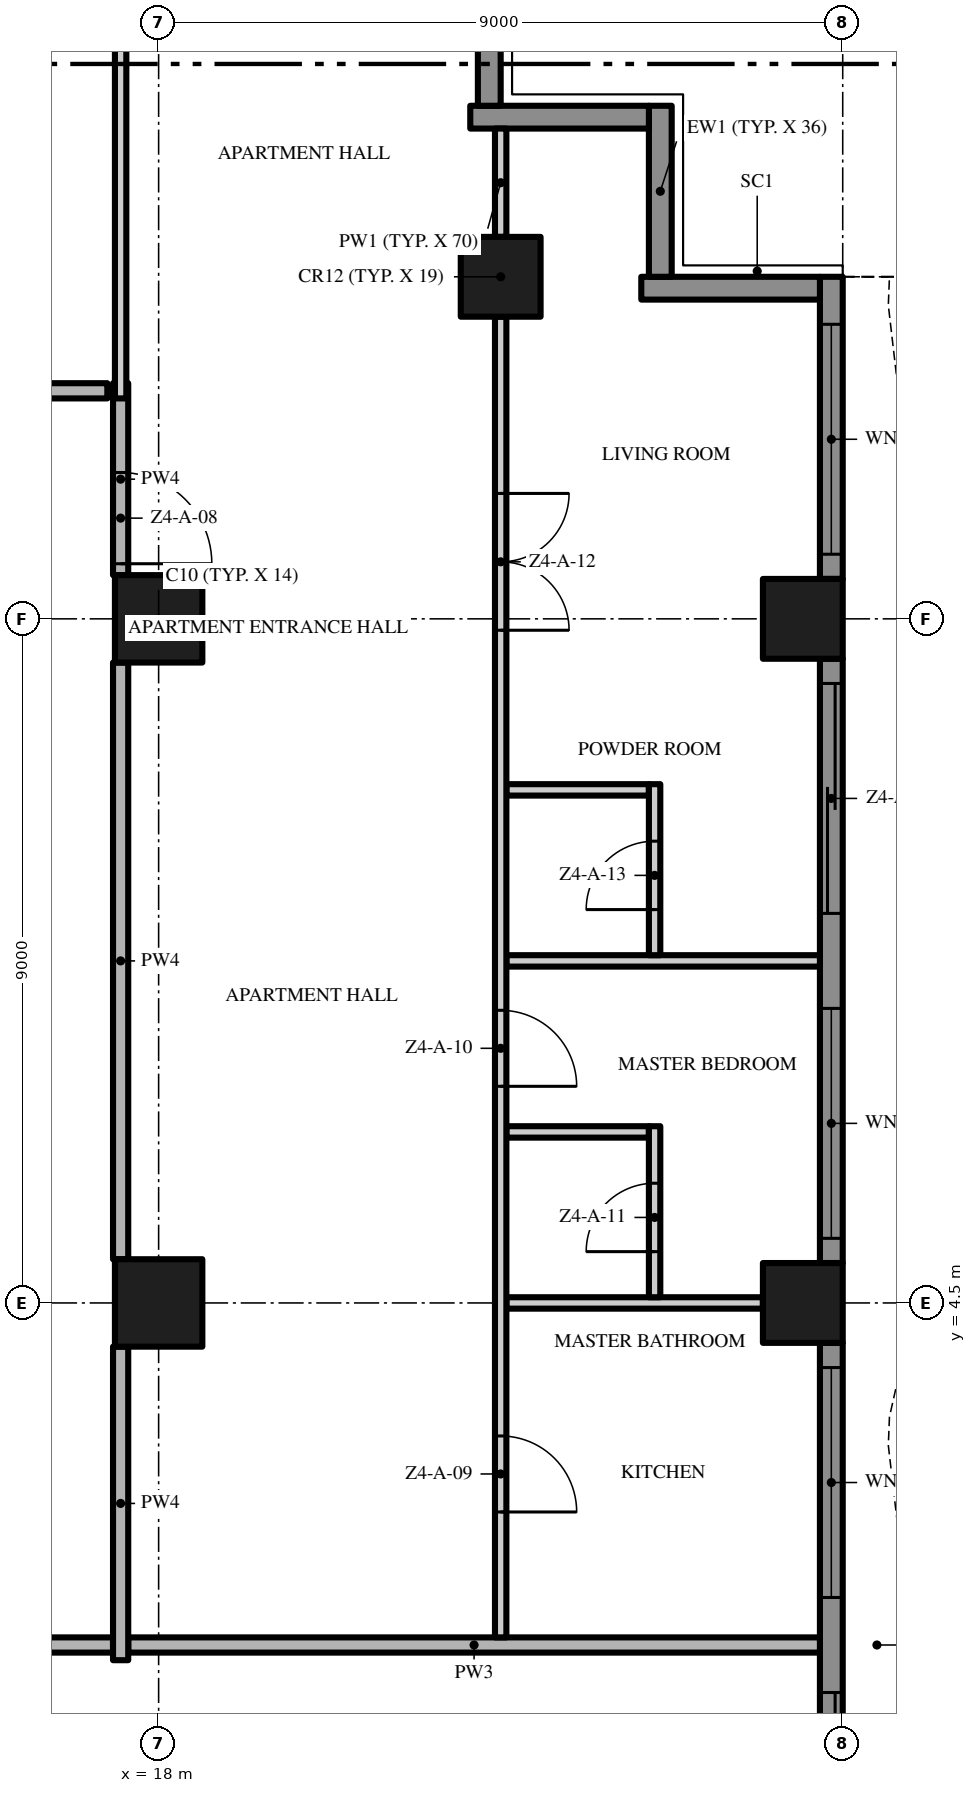
"""IFC4 building model, lengths in metres.
Left out: names, types, materials, properties, quantities, classifications, styles, units other than length and angle.
Written with IfcOpenShell. Run it as: python <this file> out.ifc"""

import sys

from ifc_helpers import new_model, si_unit, direction, frame, frame_2d, origin, origin_2d, place, context, subcontext, project, spatial, polyline, rectangle, outline, extrude, element, fill, save


model = new_model("IFC4")
c1 = context("Model", 3, precision=1e-05, world=origin(), true_north=direction((0.0, 1.0)))
c2 = subcontext(c1, "Body", "Model", "MODEL_VIEW")
j1 = project(units=[si_unit("LENGTHUNIT", "METRE"), si_unit("PLANEANGLEUNIT", "RADIAN")], contexts=[c1])
p1 = place(None, origin())
s1 = spatial("IfcSite", under=j1, at=p1, CompositionType="ELEMENT")
p2 = place(p1, origin())
s2 = spatial("IfcBuilding", under=s1, at=p2, CompositionType="ELEMENT")
p3 = place(p2, frame((0.0, 0.0, 192.0)))
s3 = spatial("IfcBuildingStorey", under=s2, at=p3, CompositionType="ELEMENT", Elevation=192.0)
for number, where, z_axis, x_axis in (
    (1, (18.0, 13.5, 0.0), (0.0, 0.0, 1.0), (1.0, 0.0, 0.0)),
    (2, (18.0, 4.5, 0.0), (0.0, 0.0, 1.0), (1.0, 0.0, 0.0)),
):
    element("IfcColumn", number, at=place(p3, frame(where, z_axis=z_axis, x_axis=x_axis)), inside=s3, PredefinedType="COLUMN", context=c2, shape_type="SweptSolid", body=[
        extrude(rectangle(XDim=1.15, YDim=1.15, at=origin_2d()), origin(), (0.0, 0.0, 1.0), 3.5),
    ])
for number, where, z_axis, x_axis in (
    (3, (26.475, 13.5, 0.0), (0.0, 0.0, 1.0), (1.0, 0.0, 0.0)),
    (4, (22.5, 18.0, 0.0), (0.0, 0.0, 1.0), (1.0, 0.0, 0.0)),
    (5, (26.475, 4.5, 0.0), (0.0, 0.0, 1.0), (1.0, 0.0, 0.0)),
):
    element("IfcColumn", number, at=place(p3, frame(where, z_axis=z_axis, x_axis=x_axis)), inside=s3, PredefinedType="COLUMN", context=c2, shape_type="SweptSolid", body=[
        extrude(rectangle(XDim=1.05, YDim=1.05, at=origin_2d()), origin(), (0.0, 0.0, 1.0), 3.5),
    ])
p4 = place(p3, frame((26.85, 3.975, 0.0), z_axis=(0.0, 0.0, 1.0), x_axis=(0.0, -1.0, 0.0)))
e6 = element("IfcWall", 6, at=p4, inside=s3, PredefinedType="SOLIDWALL", context=c2, shape_type="SweptSolid", body=[
    extrude(rectangle(XDim=7.95, YDim=0.3, at=frame_2d((3.975, 0.0))), origin(), (0.0, 0.0, 1.0), 3.5),
])
p5 = place(p4, frame((4.6, 0.0, 0.0)))
e7 = element("IfcOpeningElement", 7, at=p5, cuts=e6, PredefinedType="OPENING", context=c2, shape_type="SweptSolid", body=[
    extrude(rectangle(XDim=3.025, YDim=2.4, at=frame_2d((1.512, 1.2))), frame((0.0, 0.16, 0.0), z_axis=(0.0, -1.0, 0.0), x_axis=(1.0, 0.0, 0.0)), (0.0, 0.0, 1.0), 0.32),
])
p6 = place(p4, frame((0.325, 0.0, 0.45)))
e8 = element("IfcOpeningElement", 8, at=p6, cuts=e6, PredefinedType="OPENING", context=c2, shape_type="SweptSolid", body=[
    extrude(rectangle(XDim=3.025, YDim=2.65, at=frame_2d((1.512, 1.325))), frame((0.0, 0.16, 0.0), z_axis=(0.0, -1.0, 0.0), x_axis=(1.0, 0.0, 0.0)), (0.0, 0.0, 1.0), 0.32),
])
p7 = place(p3, frame((26.85, 12.975, 0.0), z_axis=(0.0, 0.0, 1.0), x_axis=(0.0, -1.0, 0.0)))
e9 = element("IfcWall", 9, at=p7, inside=s3, PredefinedType="SOLIDWALL", context=c2, shape_type="SweptSolid", body=[
    extrude(rectangle(XDim=7.95, YDim=0.3, at=frame_2d((3.975, 0.0))), origin(), (0.0, 0.0, 1.0), 3.5),
])
p8 = place(p7, frame((4.6, 0.0, 0.45)))
e10 = element("IfcOpeningElement", 10, at=p8, cuts=e9, PredefinedType="OPENING", context=c2, shape_type="SweptSolid", body=[
    extrude(rectangle(XDim=3.025, YDim=2.65, at=frame_2d((1.512, 1.325))), frame((0.0, 0.16, 0.0), z_axis=(0.0, -1.0, 0.0), x_axis=(1.0, 0.0, 0.0)), (0.0, 0.0, 1.0), 0.32),
])
p9 = place(p7, frame((0.325, 0.0, 0.0)))
e11 = element("IfcOpeningElement", 11, at=p9, cuts=e9, PredefinedType="OPENING", context=c2, shape_type="SweptSolid", body=[
    extrude(rectangle(XDim=3.025, YDim=2.4, at=frame_2d((1.512, 1.2))), frame((0.0, 0.16, 0.0), z_axis=(0.0, -1.0, 0.0), x_axis=(1.0, 0.0, 0.0)), (0.0, 0.0, 1.0), 0.32),
])
p10 = place(p3, frame((26.85, 18.0, 0.0), z_axis=(0.0, 0.0, 1.0), x_axis=(0.0, -1.0, 0.0)))
e12 = element("IfcWall", 12, at=p10, inside=s3, PredefinedType="SOLIDWALL", context=c2, shape_type="SweptSolid", body=[
    extrude(rectangle(XDim=3.975, YDim=0.3, at=frame_2d((1.988, 0.0))), origin(), (0.0, 0.0, 1.0), 3.5),
])
p11 = place(p10, frame((0.625, 0.0, 0.45)))
e13 = element("IfcOpeningElement", 13, at=p11, cuts=e12, PredefinedType="OPENING", context=c2, shape_type="SweptSolid", body=[
    extrude(rectangle(XDim=3.025, YDim=2.65, at=frame_2d((1.512, 1.325))), frame((0.0, 0.16, 0.0), z_axis=(0.0, -1.0, 0.0), x_axis=(1.0, 0.0, 0.0)), (0.0, 0.0, 1.0), 0.32),
])
p12 = place(p3, frame((24.35, 17.85, 0.0), z_axis=(0.0, 0.0, 1.0), x_axis=(1.0, 0.0, 0.0)))
e14 = element("IfcWall", 14, at=p12, inside=s3, PredefinedType="SOLIDWALL", context=c2, shape_type="SweptSolid", body=[
    extrude(rectangle(XDim=2.35, YDim=0.3, at=frame_2d((1.175, 0.0))), origin(), (0.0, 0.0, 1.0), 3.5),
])
p13 = place(p3, frame((24.6, 20.25, 0.0), z_axis=(0.0, 0.0, 1.0), x_axis=(0.0, -1.0, 0.0)))
e15 = element("IfcWall", 15, at=p13, inside=s3, PredefinedType="SOLIDWALL", context=c2, shape_type="SweptSolid", body=[
    extrude(rectangle(XDim=2.25, YDim=0.3, at=frame_2d((1.125, 0.0))), origin(), (0.0, 0.0, 1.0), 3.5),
])
p14 = place(p3, frame((22.1, 20.1, 0.0), z_axis=(0.0, 0.0, 1.0), x_axis=(1.0, 0.0, 0.0)))
e16 = element("IfcWall", 16, at=p14, inside=s3, PredefinedType="SOLIDWALL", context=c2, shape_type="SweptSolid", body=[
    extrude(rectangle(XDim=2.35, YDim=0.3, at=frame_2d((1.175, 0.0))), origin(), (0.0, 0.0, 1.0), 3.5),
])
p15 = place(p3, frame((22.35, 22.5, 0.0), z_axis=(0.0, 0.0, 1.0), x_axis=(0.0, -1.0, 0.0)))
e17 = element("IfcWall", 17, at=p15, inside=s3, PredefinedType="SOLIDWALL", context=c2, shape_type="SweptSolid", body=[
    extrude(rectangle(XDim=2.25, YDim=0.3, at=frame_2d((1.125, 0.0))), origin(), (0.0, 0.0, 1.0), 3.5),
])
p16 = place(p3, origin())
e18 = element("IfcWall", 18, at=p16, inside=s3, PredefinedType="USERDEFINED", context=c2, shape_type="SweptSolid", body=[
    extrude(outline(polyline([(29.649, -18.0), (28.988, -16.5), (28.255, -15.0), (27.731, -13.5), (27.6, -12.375), (27.615, -12.0), (27.951, -10.5), (28.612, -9.0), (29.345, -7.5), (29.869, -6.0), (30.0, -4.875), (29.985, -4.5), (29.649, -3.0), (28.988, -1.5), (28.255, 0.0), (27.731, 1.5), (27.6, 2.625), (27.615, 3.0), (27.951, 4.5), (28.612, 6.0), (29.345, 7.5), (29.869, 9.0), (30.0, 10.125), (29.985, 10.5), (29.649, 12.0), (28.988, 13.5), (28.255, 15.0), (27.731, 16.5), (27.6, 17.625), (27.615, 18.0), (27.365, 18.01), (27.349, 17.615), (27.486, 16.444), (28.024, 14.904), (28.761, 13.395), (29.41, 11.921), (29.736, 10.467), (29.749, 10.135), (29.624, 9.056), (29.114, 7.596), (28.385, 6.105), (27.713, 4.579), (27.366, 3.033), (27.349, 2.615), (27.486, 1.444), (28.024, -0.096), (28.761, -1.605), (29.41, -3.079), (29.736, -4.533), (29.749, -4.865), (29.624, -5.944), (29.114, -7.404), (28.385, -8.895), (27.713, -10.421), (27.366, -11.967), (27.349, -12.385), (27.486, -13.556), (28.024, -15.096), (28.761, -16.605), (29.42, -18.101), (29.649, -18.0)])), origin(), (0.0, 0.0, 1.0), 0.9),
])
p17 = place(p3, frame((17.4, 0.0, 0.0), z_axis=(0.0, 0.0, 1.0), x_axis=(-1.0, 0.0, 0.0)))
e19 = element("IfcWall", 19, at=p17, inside=s3, PredefinedType="PARTITIONING", context=c2, shape_type="SweptSolid", body=[
    extrude(rectangle(XDim=17.3, YDim=0.2, at=frame_2d((8.65, 0.0))), origin(), (0.0, 0.0, 1.0), 3.5),
])
p18 = place(p17, frame((7.65, 0.0, 0.0)))
e20 = element("IfcOpeningElement", 20, at=p18, cuts=e19, PredefinedType="OPENING", context=c2, shape_type="SweptSolid", body=[
    extrude(rectangle(XDim=1.5, YDim=2.4, at=frame_2d((0.75, 1.2))), frame((0.0, 0.11, 0.0), z_axis=(0.0, -1.0, 0.0), x_axis=(1.0, 0.0, 0.0)), (0.0, 0.0, 1.0), 0.22),
])
p19 = place(p3, frame((17.6, 0.0, 0.0), z_axis=(0.0, 0.0, 1.0), x_axis=(1.0, 0.0, 0.0)))
e21 = element("IfcWall", 21, at=p19, inside=s3, PredefinedType="PARTITIONING", context=c2, shape_type="SweptSolid", body=[
    extrude(rectangle(XDim=9.1, YDim=0.2, at=frame_2d((4.55, 0.0))), origin(), (0.0, 0.0, 1.0), 3.5),
])
p20 = place(p3, frame((22.575, 4.5, 0.0), z_axis=(0.0, 0.0, 1.0), x_axis=(1.0, 0.0, 0.0)))
e22 = element("IfcWall", 22, at=p20, inside=s3, PredefinedType="PARTITIONING", context=c2, shape_type="SweptSolid", body=[
    extrude(rectangle(XDim=3.375, YDim=0.15, at=frame_2d((1.688, 0.0))), origin(), (0.0, 0.0, 1.0), 3.5),
])
p21 = place(p3, frame((22.575, 6.75, 0.0), z_axis=(0.0, 0.0, 1.0), x_axis=(1.0, 0.0, 0.0)))
e23 = element("IfcWall", 23, at=p21, inside=s3, PredefinedType="PARTITIONING", context=c2, shape_type="SweptSolid", body=[
    extrude(rectangle(XDim=1.875, YDim=0.15, at=frame_2d((0.938, 0.0))), origin(), (0.0, 0.0, 1.0), 3.5),
])
p22 = place(p3, frame((22.575, 9.0, 0.0), z_axis=(0.0, 0.0, 1.0), x_axis=(1.0, 0.0, 0.0)))
e24 = element("IfcWall", 24, at=p22, inside=s3, PredefinedType="PARTITIONING", context=c2, shape_type="SweptSolid", body=[
    extrude(rectangle(XDim=4.125, YDim=0.15, at=frame_2d((2.062, 0.0))), origin(), (0.0, 0.0, 1.0), 3.5),
])
p23 = place(p3, frame((22.575, 11.25, 0.0), z_axis=(0.0, 0.0, 1.0), x_axis=(1.0, 0.0, 0.0)))
e25 = element("IfcWall", 25, at=p23, inside=s3, PredefinedType="PARTITIONING", context=c2, shape_type="SweptSolid", body=[
    extrude(rectangle(XDim=1.875, YDim=0.15, at=frame_2d((0.938, 0.0))), origin(), (0.0, 0.0, 1.0), 3.5),
])
p24 = place(p3, frame((13.5, 16.5, 0.0), z_axis=(0.0, 0.0, 1.0), x_axis=(1.0, 0.0, 0.0)))
e26 = element("IfcWall", 26, at=p24, inside=s3, PredefinedType="PARTITIONING", context=c2, shape_type="SweptSolid", body=[
    extrude(rectangle(XDim=3.825, YDim=0.2, at=frame_2d((1.913, 0.0))), origin(), (0.0, 0.0, 1.0), 3.5),
])
p25 = place(p24, frame((1.55, 0.0, 0.0)))
e27 = element("IfcOpeningElement", 27, at=p25, cuts=e26, PredefinedType="OPENING", context=c2, shape_type="SweptSolid", body=[
    extrude(rectangle(XDim=0.9, YDim=2.1, at=frame_2d((0.45, 1.05))), frame((0.0, 0.11, 0.0), z_axis=(0.0, -1.0, 0.0), x_axis=(1.0, 0.0, 0.0)), (0.0, 0.0, 1.0), 0.22),
])
p26 = place(p3, frame((17.5, -0.2, 0.0), z_axis=(0.0, 0.0, 1.0), x_axis=(0.0, 1.0, 0.0)))
e28 = element("IfcWall", 28, at=p26, inside=s3, PredefinedType="PARTITIONING", context=c2, shape_type="SweptSolid", body=[
    extrude(rectangle(XDim=4.125, YDim=0.2, at=frame_2d((2.062, 0.0))), origin(), (0.0, 0.0, 1.0), 3.5),
])
p27 = place(p3, frame((17.5, 5.075, 0.0), z_axis=(0.0, 0.0, 1.0), x_axis=(0.0, 1.0, 0.0)))
e29 = element("IfcWall", 29, at=p27, inside=s3, PredefinedType="PARTITIONING", context=c2, shape_type="SweptSolid", body=[
    extrude(rectangle(XDim=7.85, YDim=0.2, at=frame_2d((3.925, 0.0))), origin(), (0.0, 0.0, 1.0), 3.5),
])
p28 = place(p3, frame((17.5, 16.6, 0.0), z_axis=(0.0, 0.0, 1.0), x_axis=(0.0, -1.0, 0.0)))
e30 = element("IfcWall", 30, at=p28, inside=s3, PredefinedType="PARTITIONING", context=c2, shape_type="SweptSolid", body=[
    extrude(rectangle(XDim=2.525, YDim=0.2, at=frame_2d((1.262, 0.0))), origin(), (0.0, 0.0, 1.0), 3.5),
])
p29 = place(p28, frame((1.175, 0.0, 0.0)))
e31 = element("IfcOpeningElement", 31, at=p29, cuts=e30, PredefinedType="OPENING", context=c2, shape_type="SweptSolid", body=[
    extrude(rectangle(XDim=1.2, YDim=2.4, at=frame_2d((0.6, 1.2))), frame((0.0, 0.11, 0.0), z_axis=(0.0, -1.0, 0.0), x_axis=(1.0, 0.0, 0.0)), (0.0, 0.0, 1.0), 0.22),
])
p30 = place(p3, frame((17.5, 16.4, 0.0), z_axis=(0.0, 0.0, 1.0), x_axis=(0.0, 1.0, 0.0)))
e32 = element("IfcWall", 32, at=p30, inside=s3, PredefinedType="PARTITIONING", context=c2, shape_type="SweptSolid", body=[
    extrude(rectangle(XDim=5.05, YDim=0.15, at=frame_2d((2.525, 0.0))), origin(), (0.0, 0.0, 1.0), 3.5),
])
p31 = place(p3, frame((22.5, 17.475, 0.0), z_axis=(0.0, 0.0, 1.0), x_axis=(0.0, -1.0, 0.0)))
e33 = element("IfcWall", 33, at=p31, inside=s3, PredefinedType="PARTITIONING", context=c2, shape_type="SweptSolid", body=[
    extrude(rectangle(XDim=17.375, YDim=0.15, at=frame_2d((8.688, 0.0))), origin(), (0.0, 0.0, 1.0), 3.5),
])
p32 = place(p31, frame((14.725, 0.0, 0.0)))
e34 = element("IfcOpeningElement", 34, at=p32, cuts=e33, PredefinedType="OPENING", context=c2, shape_type="SweptSolid", body=[
    extrude(rectangle(XDim=1.0, YDim=2.4, at=frame_2d((0.5, 1.2))), frame((0.0, 0.085, 0.0), z_axis=(0.0, -1.0, 0.0), x_axis=(1.0, 0.0, 0.0)), (0.0, 0.0, 1.0), 0.17),
])
p33 = place(p31, frame((9.125, 0.0, 0.0)))
e35 = element("IfcOpeningElement", 35, at=p33, cuts=e33, PredefinedType="OPENING", context=c2, shape_type="SweptSolid", body=[
    extrude(rectangle(XDim=1.0, YDim=2.4, at=frame_2d((0.5, 1.2))), frame((0.0, 0.085, 0.0), z_axis=(0.0, -1.0, 0.0), x_axis=(1.0, 0.0, 0.0)), (0.0, 0.0, 1.0), 0.17),
])
p34 = place(p31, frame((2.325, 0.0, 0.0)))
e36 = element("IfcOpeningElement", 36, at=p34, cuts=e33, PredefinedType="OPENING", context=c2, shape_type="SweptSolid", body=[
    extrude(rectangle(XDim=1.8, YDim=2.4, at=frame_2d((0.9, 1.2))), frame((0.0, 0.085, 0.0), z_axis=(0.0, -1.0, 0.0), x_axis=(1.0, 0.0, 0.0)), (0.0, 0.0, 1.0), 0.17),
])
p35 = place(p3, frame((22.5, 18.525, 0.0), z_axis=(0.0, 0.0, 1.0), x_axis=(0.0, 1.0, 0.0)))
e37 = element("IfcWall", 37, at=p35, inside=s3, PredefinedType="PARTITIONING", context=c2, shape_type="SweptSolid", body=[
    extrude(rectangle(XDim=1.425, YDim=0.15, at=frame_2d((0.713, 0.0))), origin(), (0.0, 0.0, 1.0), 3.5),
])
p36 = place(p3, frame((24.525, 4.575, 0.0), z_axis=(0.0, 0.0, 1.0), x_axis=(0.0, 1.0, 0.0)))
e38 = element("IfcWall", 38, at=p36, inside=s3, PredefinedType="PARTITIONING", context=c2, shape_type="SweptSolid", body=[
    extrude(rectangle(XDim=2.25, YDim=0.15, at=frame_2d((1.125, 0.0))), origin(), (0.0, 0.0, 1.0), 3.5),
])
p37 = place(p36, frame((0.6, 0.0, 0.0)))
e39 = element("IfcOpeningElement", 39, at=p37, cuts=e38, PredefinedType="OPENING", context=c2, shape_type="SweptSolid", body=[
    extrude(rectangle(XDim=0.9, YDim=2.1, at=frame_2d((0.45, 1.05))), frame((0.0, 0.085, 0.0), z_axis=(0.0, -1.0, 0.0), x_axis=(1.0, 0.0, 0.0)), (0.0, 0.0, 1.0), 0.17),
])
p38 = place(p3, frame((24.525, 9.075, 0.0), z_axis=(0.0, 0.0, 1.0), x_axis=(0.0, 1.0, 0.0)))
e40 = element("IfcWall", 40, at=p38, inside=s3, PredefinedType="PARTITIONING", context=c2, shape_type="SweptSolid", body=[
    extrude(rectangle(XDim=2.25, YDim=0.15, at=frame_2d((1.125, 0.0))), origin(), (0.0, 0.0, 1.0), 3.5),
])
p39 = place(p38, frame((0.6, 0.0, 0.0)))
e41 = element("IfcOpeningElement", 41, at=p39, cuts=e40, PredefinedType="OPENING", context=c2, shape_type="SweptSolid", body=[
    extrude(rectangle(XDim=0.9, YDim=2.1, at=frame_2d((0.45, 1.05))), frame((0.0, 0.085, 0.0), z_axis=(0.0, -1.0, 0.0), x_axis=(1.0, 0.0, 0.0)), (0.0, 0.0, 1.0), 0.17),
])
p40 = place(p5, origin())
e42 = element("IfcDoor", 42, at=p40, inside=s3, OperationType="SINGLE_SWING_LEFT", PredefinedType="DOOR", context=c2, shape_type="SweptSolid", body=[
    extrude(rectangle(XDim=3.025, YDim=2.4, at=frame_2d((1.512, 1.2))), frame((0.0, 0.025, 0.0), z_axis=(0.0, -1.0, 0.0), x_axis=(1.0, 0.0, 0.0)), (0.0, 0.0, 1.0), 0.05),
])
fill(e7, e42)
p41 = place(p6, origin())
e43 = element("IfcWindow", 43, at=p41, inside=s3, PartitioningType="SINGLE_PANEL", PredefinedType="WINDOW", context=c2, shape_type="SweptSolid", body=[
    extrude(rectangle(XDim=3.025, YDim=2.65, at=frame_2d((1.512, 1.325))), frame((0.0, 0.03, 0.0), z_axis=(0.0, -1.0, 0.0), x_axis=(1.0, 0.0, 0.0)), (0.0, 0.0, 1.0), 0.06),
])
fill(e8, e43)
p42 = place(p8, origin())
e44 = element("IfcWindow", 44, at=p42, inside=s3, PartitioningType="SINGLE_PANEL", PredefinedType="WINDOW", context=c2, shape_type="SweptSolid", body=[
    extrude(rectangle(XDim=3.025, YDim=2.65, at=frame_2d((1.512, 1.325))), frame((0.0, 0.03, 0.0), z_axis=(0.0, -1.0, 0.0), x_axis=(1.0, 0.0, 0.0)), (0.0, 0.0, 1.0), 0.06),
])
fill(e10, e44)
p43 = place(p9, origin())
e45 = element("IfcDoor", 45, at=p43, inside=s3, OperationType="SINGLE_SWING_LEFT", PredefinedType="DOOR", context=c2, shape_type="SweptSolid", body=[
    extrude(rectangle(XDim=3.025, YDim=2.4, at=frame_2d((1.512, 1.2))), frame((0.0, 0.025, 0.0), z_axis=(0.0, -1.0, 0.0), x_axis=(1.0, 0.0, 0.0)), (0.0, 0.0, 1.0), 0.05),
])
fill(e11, e45)
p44 = place(p11, origin())
e46 = element("IfcWindow", 46, at=p44, inside=s3, PartitioningType="SINGLE_PANEL", PredefinedType="WINDOW", context=c2, shape_type="SweptSolid", body=[
    extrude(rectangle(XDim=3.025, YDim=2.65, at=frame_2d((1.512, 1.325))), frame((0.0, 0.03, 0.0), z_axis=(0.0, -1.0, 0.0), x_axis=(1.0, 0.0, 0.0)), (0.0, 0.0, 1.0), 0.06),
])
fill(e13, e46)
p45 = place(p29, origin())
e47 = element("IfcDoor", 47, at=p45, inside=s3, OperationType="SINGLE_SWING_RIGHT", PredefinedType="DOOR", context=c2, shape_type="SweptSolid", body=[
    extrude(rectangle(XDim=1.2, YDim=2.4, at=frame_2d((0.6, 1.2))), frame((0.0, 0.025, 0.0), z_axis=(0.0, -1.0, 0.0), x_axis=(1.0, 0.0, 0.0)), (0.0, 0.0, 1.0), 0.05),
])
fill(e31, e47)
p46 = place(p32, origin())
e48 = element("IfcDoor", 48, at=p46, inside=s3, OperationType="SINGLE_SWING_RIGHT", PredefinedType="DOOR", context=c2, shape_type="SweptSolid", body=[
    extrude(rectangle(XDim=1.0, YDim=2.4, at=frame_2d((0.5, 1.2))), frame((0.0, 0.025, 0.0), z_axis=(0.0, -1.0, 0.0), x_axis=(1.0, 0.0, 0.0)), (0.0, 0.0, 1.0), 0.05),
])
fill(e34, e48)
p47 = place(p33, origin())
e49 = element("IfcDoor", 49, at=p47, inside=s3, OperationType="SINGLE_SWING_RIGHT", PredefinedType="DOOR", context=c2, shape_type="SweptSolid", body=[
    extrude(rectangle(XDim=1.0, YDim=2.4, at=frame_2d((0.5, 1.2))), frame((0.0, 0.025, 0.0), z_axis=(0.0, -1.0, 0.0), x_axis=(1.0, 0.0, 0.0)), (0.0, 0.0, 1.0), 0.05),
])
fill(e35, e49)
p48 = place(p37, origin())
e50 = element("IfcDoor", 50, at=p48, inside=s3, OperationType="SINGLE_SWING_LEFT", PredefinedType="DOOR", context=c2, shape_type="SweptSolid", body=[
    extrude(rectangle(XDim=0.9, YDim=2.1, at=frame_2d((0.45, 1.05))), frame((0.0, 0.025, 0.0), z_axis=(0.0, -1.0, 0.0), x_axis=(1.0, 0.0, 0.0)), (0.0, 0.0, 1.0), 0.05),
])
fill(e39, e50)
p49 = place(p34, origin())
e51 = element("IfcDoor", 51, at=p49, inside=s3, OperationType="DOUBLE_DOOR_SINGLE_SWING", PredefinedType="DOOR", context=c2, shape_type="SweptSolid", body=[
    extrude(rectangle(XDim=1.8, YDim=2.4, at=frame_2d((0.9, 1.2))), frame((0.0, 0.025, 0.0), z_axis=(0.0, -1.0, 0.0), x_axis=(1.0, 0.0, 0.0)), (0.0, 0.0, 1.0), 0.05),
])
fill(e36, e51)
p50 = place(p39, origin())
e52 = element("IfcDoor", 52, at=p50, inside=s3, OperationType="SINGLE_SWING_LEFT", PredefinedType="DOOR", context=c2, shape_type="SweptSolid", body=[
    extrude(rectangle(XDim=0.9, YDim=2.1, at=frame_2d((0.45, 1.05))), frame((0.0, 0.025, 0.0), z_axis=(0.0, -1.0, 0.0), x_axis=(1.0, 0.0, 0.0)), (0.0, 0.0, 1.0), 0.05),
])
fill(e41, e52)
save(model, sys.argv[1])
